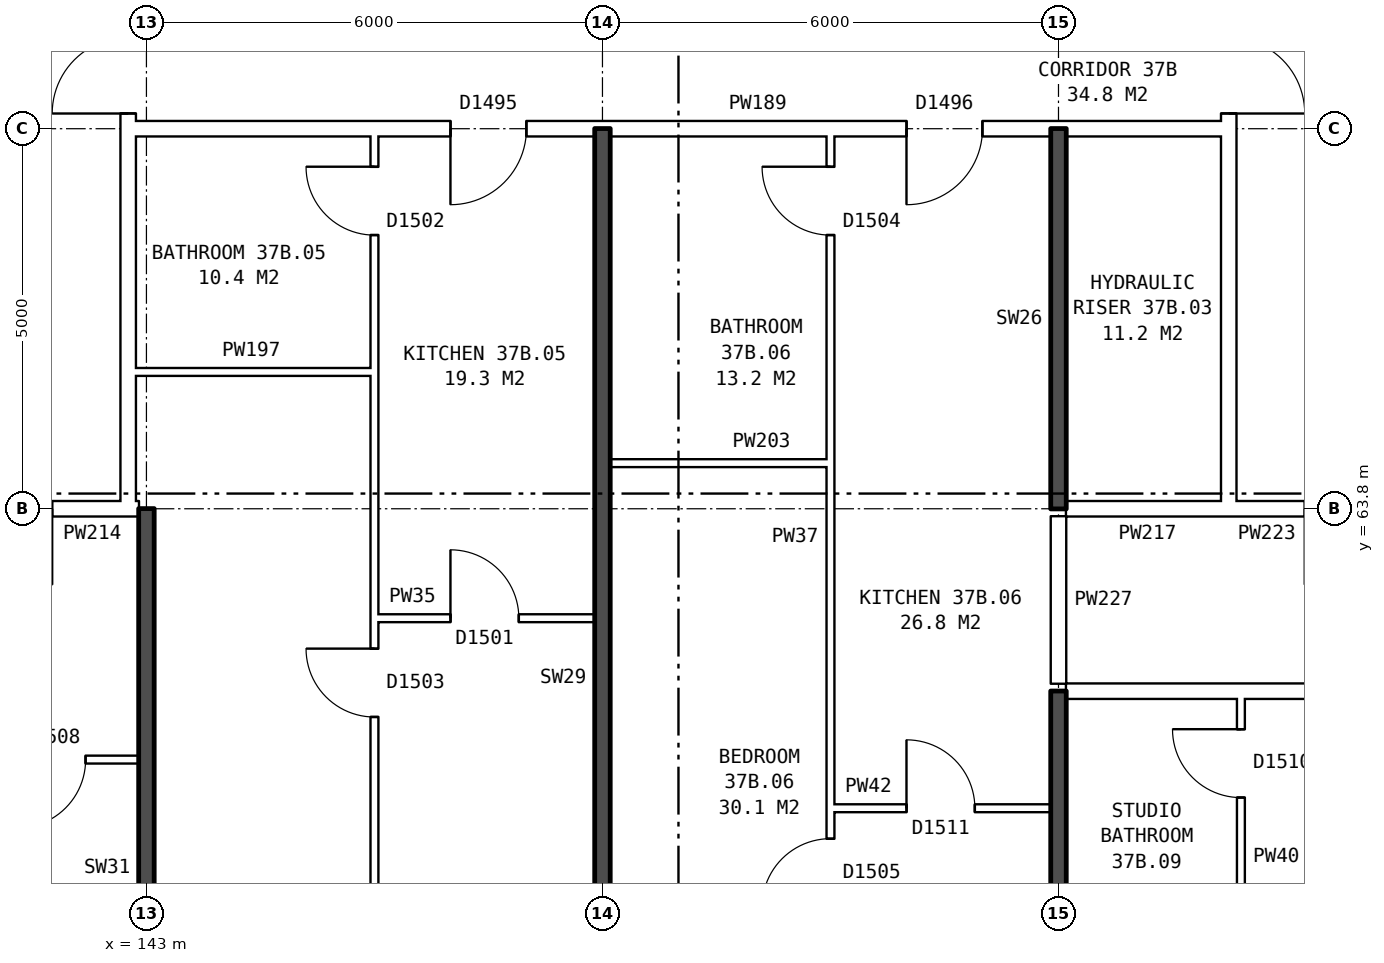
"""IFC4 building model, lengths in metres.
Left out: names, types, materials, properties, quantities, classifications, styles, units other than length and angle.
Written with IfcOpenShell. Run it as: python <this file> out.ifc"""

import sys

from ifc_helpers import new_model, si_unit, direction, frame, frame_2d, origin, place, context, subcontext, project, spatial, rectangle, extrude, element, fill, save


model = new_model("IFC4")
c1 = context("Model", 3, precision=1e-05, world=origin(), true_north=direction((0.0, 1.0)))
c2 = subcontext(c1, "Body", "Model", "MODEL_VIEW")
j1 = project(units=[si_unit("LENGTHUNIT", "METRE"), si_unit("PLANEANGLEUNIT", "RADIAN")], contexts=[c1])
p1 = place(None, origin())
s1 = spatial("IfcSite", under=j1, at=p1, CompositionType="ELEMENT")
p2 = place(p1, origin())
s2 = spatial("IfcBuilding", under=s1, at=p2, CompositionType="ELEMENT")
p3 = place(p2, frame((0.0, 0.0, 133.0)))
s3 = spatial("IfcBuildingStorey", under=s2, at=p3, CompositionType="ELEMENT", Elevation=133.0)
p4 = place(p3, frame((142.76, 63.9, 0.0), z_axis=(0.0, 0.0, 1.0), x_axis=(0.0, 1.0, 0.0)))
e1 = element("IfcWall", 1, at=p4, inside=s3, PredefinedType="PARTITIONING", context=c2, shape_type="SweptSolid", body=[
    extrude(rectangle(XDim=12.2, YDim=0.2, at=frame_2d((6.1, 0.0))), origin(), (0.0, 0.0, 1.0), 2.85),
])
p5 = place(p4, frame((5.1, 0.0, 0.0)))
e2 = element("IfcOpeningElement", 2, at=p5, cuts=e1, PredefinedType="OPENING", context=c2, shape_type="SweptSolid", body=[
    extrude(rectangle(XDim=2.0, YDim=2.1, at=frame_2d((1.0, 1.05))), frame((0.0, 0.11, 0.0), z_axis=(0.0, -1.0, 0.0), x_axis=(1.0, 0.0, 0.0)), (0.0, 0.0, 1.0), 0.22),
])
p6 = place(p3, frame((157.24, 63.9, 0.0), z_axis=(0.0, 0.0, 1.0), x_axis=(0.0, 1.0, 0.0)))
e3 = element("IfcWall", 3, at=p6, inside=s3, PredefinedType="PARTITIONING", context=c2, shape_type="SweptSolid", body=[
    extrude(rectangle(XDim=12.2, YDim=0.2, at=frame_2d((6.1, 0.0))), origin(), (0.0, 0.0, 1.0), 2.85),
])
p7 = place(p6, frame((5.1, 0.0, 0.0)))
e4 = element("IfcOpeningElement", 4, at=p7, cuts=e3, PredefinedType="OPENING", context=c2, shape_type="SweptSolid", body=[
    extrude(rectangle(XDim=2.0, YDim=2.1, at=frame_2d((1.0, 1.05))), frame((0.0, 0.11, 0.0), z_axis=(0.0, -1.0, 0.0), x_axis=(1.0, 0.0, 0.0)), (0.0, 0.0, 1.0), 0.22),
])
p8 = place(p3, frame((152.0, 59.86, 0.0), z_axis=(0.0, 0.0, 1.0), x_axis=(1.0, 0.0, 0.0)))
e5 = element("IfcWall", 5, at=p8, inside=s3, PredefinedType="PARTITIONING", context=c2, shape_type="SweptSolid", body=[
    extrude(rectangle(XDim=2.9, YDim=0.1, at=frame_2d((1.45, 0.0))), origin(), (0.0, 0.0, 1.0), 2.85),
])
p9 = place(p8, frame((1.0, 0.0, 0.0)))
e6 = element("IfcOpeningElement", 6, at=p9, cuts=e5, PredefinedType="OPENING", context=c2, shape_type="SweptSolid", body=[
    extrude(rectangle(XDim=0.9, YDim=2.1, at=frame_2d((0.45, 1.05))), frame((0.0, 0.06, 0.0), z_axis=(0.0, -1.0, 0.0), x_axis=(1.0, 0.0, 0.0)), (0.0, 0.0, 1.0), 0.12),
])
p10 = place(p3, frame((137.1, 60.5, 0.0), z_axis=(0.0, 0.0, 1.0), x_axis=(1.0, 0.0, 0.0)))
e7 = element("IfcWall", 7, at=p10, inside=s3, PredefinedType="PARTITIONING", context=c2, shape_type="SweptSolid", body=[
    extrude(rectangle(XDim=5.8, YDim=0.1, at=frame_2d((2.9, 0.0))), origin(), (0.0, 0.0, 1.0), 2.85),
])
p11 = place(p10, frame((1.3, 0.0, 0.0)))
e8 = element("IfcOpeningElement", 8, at=p11, cuts=e7, PredefinedType="OPENING", context=c2, shape_type="SweptSolid", body=[
    extrude(rectangle(XDim=0.9, YDim=2.1, at=frame_2d((0.45, 1.05))), frame((0.0, 0.06, 0.0), z_axis=(0.0, -1.0, 0.0), x_axis=(1.0, 0.0, 0.0)), (0.0, 0.0, 1.0), 0.12),
])
p12 = place(p10, frame((4.2, 0.0, 0.0)))
e9 = element("IfcOpeningElement", 9, at=p12, cuts=e7, PredefinedType="OPENING", context=c2, shape_type="SweptSolid", body=[
    extrude(rectangle(XDim=0.9, YDim=2.1, at=frame_2d((0.45, 1.05))), frame((0.0, 0.06, 0.0), z_axis=(0.0, -1.0, 0.0), x_axis=(1.0, 0.0, 0.0)), (0.0, 0.0, 1.0), 0.12),
])
p13 = place(p3, frame((155.1, 61.4, 0.0), z_axis=(0.0, 0.0, 1.0), x_axis=(1.0, 0.0, 0.0)))
e10 = element("IfcWall", 10, at=p13, inside=s3, PredefinedType="PARTITIONING", context=c2, shape_type="SweptSolid", body=[
    extrude(rectangle(XDim=17.29, YDim=0.2, at=frame_2d((8.645, 0.0))), origin(), (0.0, 0.0, 1.0), 2.85),
])
p14 = place(p13, frame((3.6, 0.0, 0.0)))
e11 = element("IfcOpeningElement", 11, at=p14, cuts=e10, PredefinedType="OPENING", context=c2, shape_type="SweptSolid", body=[
    extrude(rectangle(XDim=1.0, YDim=2.1, at=frame_2d((0.5, 1.05))), frame((0.0, 0.11, 0.0), z_axis=(0.0, -1.0, 0.0), x_axis=(1.0, 0.0, 0.0)), (0.0, 0.0, 1.0), 0.22),
])
p15 = place(p13, frame((8.4, 0.0, 0.0)))
e12 = element("IfcOpeningElement", 12, at=p15, cuts=e10, PredefinedType="OPENING", context=c2, shape_type="SweptSolid", body=[
    extrude(rectangle(XDim=1.0, YDim=2.1, at=frame_2d((0.5, 1.05))), frame((0.0, 0.11, 0.0), z_axis=(0.0, -1.0, 0.0), x_axis=(1.0, 0.0, 0.0)), (0.0, 0.0, 1.0), 0.22),
])
p16 = place(p3, frame((146.0, 62.36, 0.0), z_axis=(0.0, 0.0, 1.0), x_axis=(1.0, 0.0, 0.0)))
e13 = element("IfcWall", 13, at=p16, inside=s3, PredefinedType="PARTITIONING", context=c2, shape_type="SweptSolid", body=[
    extrude(rectangle(XDim=2.9, YDim=0.1, at=frame_2d((1.45, 0.0))), origin(), (0.0, 0.0, 1.0), 2.85),
])
p17 = place(p16, frame((1.0, 0.0, 0.0)))
e14 = element("IfcOpeningElement", 14, at=p17, cuts=e13, PredefinedType="OPENING", context=c2, shape_type="SweptSolid", body=[
    extrude(rectangle(XDim=0.9, YDim=2.1, at=frame_2d((0.45, 1.05))), frame((0.0, 0.06, 0.0), z_axis=(0.0, -1.0, 0.0), x_axis=(1.0, 0.0, 0.0)), (0.0, 0.0, 1.0), 0.12),
])
p18 = place(p3, frame((139.76, 63.8, 0.0), z_axis=(0.0, 0.0, 1.0), x_axis=(1.0, 0.0, 0.0)))
e15 = element("IfcWall", 15, at=p18, inside=s3, PredefinedType="PARTITIONING", context=c2, shape_type="SweptSolid", body=[
    extrude(rectangle(XDim=3.0, YDim=0.2, at=frame_2d((1.5, 0.0))), origin(), (0.0, 0.0, 1.0), 2.85),
])
p19 = place(p18, frame((1.0, 0.0, 0.0)))
e16 = element("IfcOpeningElement", 16, at=p19, cuts=e15, PredefinedType="OPENING", context=c2, shape_type="SweptSolid", body=[
    extrude(rectangle(XDim=1.0, YDim=2.1, at=frame_2d((0.5, 1.05))), frame((0.0, 0.11, 0.0), z_axis=(0.0, -1.0, 0.0), x_axis=(1.0, 0.0, 0.0)), (0.0, 0.0, 1.0), 0.22),
])
p20 = place(p3, frame((142.76, 63.8, 0.0), z_axis=(0.0, 0.0, 1.0), x_axis=(1.0, 0.0, 0.0)))
e17 = element("IfcWall", 17, at=p20, inside=s3, PredefinedType="PARTITIONING", context=c2, shape_type="SweptSolid", body=[
    extrude(rectangle(XDim=0.14, YDim=0.2, at=frame_2d((0.07, 0.0))), origin(), (0.0, 0.0, 1.0), 2.85),
])
p21 = place(p3, frame((155.1, 63.8, 0.0), z_axis=(0.0, 0.0, 1.0), x_axis=(1.0, 0.0, 0.0)))
e18 = element("IfcWall", 18, at=p21, inside=s3, PredefinedType="PARTITIONING", context=c2, shape_type="SweptSolid", body=[
    extrude(rectangle(XDim=2.14, YDim=0.2, at=frame_2d((1.07, 0.0))), origin(), (0.0, 0.0, 1.0), 2.85),
])
p22 = place(p3, frame((157.24, 63.8, 0.0), z_axis=(0.0, 0.0, 1.0), x_axis=(1.0, 0.0, 0.0)))
e19 = element("IfcWall", 19, at=p22, inside=s3, PredefinedType="PARTITIONING", context=c2, shape_type="SweptSolid", body=[
    extrude(rectangle(XDim=3.0, YDim=0.2, at=frame_2d((1.5, 0.0))), origin(), (0.0, 0.0, 1.0), 2.85),
])
p23 = place(p22, frame((1.0, 0.0, 0.0)))
e20 = element("IfcOpeningElement", 20, at=p23, cuts=e19, PredefinedType="OPENING", context=c2, shape_type="SweptSolid", body=[
    extrude(rectangle(XDim=1.0, YDim=2.1, at=frame_2d((0.5, 1.05))), frame((0.0, 0.11, 0.0), z_axis=(0.0, -1.0, 0.0), x_axis=(1.0, 0.0, 0.0)), (0.0, 0.0, 1.0), 0.22),
])
p24 = place(p3, frame((149.1, 64.4, 0.0), z_axis=(0.0, 0.0, 1.0), x_axis=(1.0, 0.0, 0.0)))
e21 = element("IfcWall", 21, at=p24, inside=s3, PredefinedType="PARTITIONING", context=c2, shape_type="SweptSolid", body=[
    extrude(rectangle(XDim=2.9, YDim=0.1, at=frame_2d((1.45, 0.0))), origin(), (0.0, 0.0, 1.0), 2.85),
])
p25 = place(p3, frame((142.76, 65.6, 0.0), z_axis=(0.0, 0.0, 1.0), x_axis=(1.0, 0.0, 0.0)))
e22 = element("IfcWall", 22, at=p25, inside=s3, PredefinedType="PARTITIONING", context=c2, shape_type="SweptSolid", body=[
    extrude(rectangle(XDim=3.24, YDim=0.1, at=frame_2d((1.62, 0.0))), origin(), (0.0, 0.0, 1.0), 2.85),
])
p26 = place(p3, frame((142.76, 68.8, 0.0), z_axis=(0.0, 0.0, 1.0), x_axis=(1.0, 0.0, 0.0)))
e23 = element("IfcWall", 23, at=p26, inside=s3, PredefinedType="PARTITIONING", context=c2, shape_type="SweptSolid", body=[
    extrude(rectangle(XDim=14.48, YDim=0.2, at=frame_2d((7.24, 0.0))), origin(), (0.0, 0.0, 1.0), 2.85),
])
p27 = place(p26, frame((4.24, 0.0, 0.0)))
e24 = element("IfcOpeningElement", 24, at=p27, cuts=e23, PredefinedType="OPENING", context=c2, shape_type="SweptSolid", body=[
    extrude(rectangle(XDim=1.0, YDim=2.1, at=frame_2d((0.5, 1.05))), frame((0.0, 0.11, 0.0), z_axis=(0.0, -1.0, 0.0), x_axis=(1.0, 0.0, 0.0)), (0.0, 0.0, 1.0), 0.22),
])
p28 = place(p26, frame((10.24, 0.0, 0.0)))
e25 = element("IfcOpeningElement", 25, at=p28, cuts=e23, PredefinedType="OPENING", context=c2, shape_type="SweptSolid", body=[
    extrude(rectangle(XDim=1.0, YDim=2.1, at=frame_2d((0.5, 1.05))), frame((0.0, 0.11, 0.0), z_axis=(0.0, -1.0, 0.0), x_axis=(1.0, 0.0, 0.0)), (0.0, 0.0, 1.0), 0.22),
])
p29 = place(p3, frame((143.0, 54.36, 0.0), z_axis=(0.0, 0.0, 1.0), x_axis=(0.0, 1.0, 0.0)))
e26 = element("IfcWall", 26, at=p29, inside=s3, PredefinedType="SOLIDWALL", context=c2, shape_type="SweptSolid", body=[
    extrude(rectangle(XDim=9.44, YDim=0.2, at=frame_2d((4.72, 0.0))), origin(), (0.0, 0.0, 1.0), 2.85),
])
p30 = place(p3, frame((146.0, 54.36, 0.0), z_axis=(0.0, 0.0, 1.0), x_axis=(0.0, 1.0, 0.0)))
e27 = element("IfcWall", 27, at=p30, inside=s3, PredefinedType="PARTITIONING", context=c2, shape_type="SweptSolid", body=[
    extrude(rectangle(XDim=14.34, YDim=0.1, at=frame_2d((7.17, 0.0))), origin(), (0.0, 0.0, 1.0), 2.85),
])
p31 = place(p30, frame((6.7, 0.0, 0.0)))
e28 = element("IfcOpeningElement", 28, at=p31, cuts=e27, PredefinedType="OPENING", context=c2, shape_type="SweptSolid", body=[
    extrude(rectangle(XDim=0.9, YDim=2.1, at=frame_2d((0.45, 1.05))), frame((0.0, 0.06, 0.0), z_axis=(0.0, -1.0, 0.0), x_axis=(1.0, 0.0, 0.0)), (0.0, 0.0, 1.0), 0.12),
])
p32 = place(p30, frame((13.04, 0.0, 0.0)))
e29 = element("IfcOpeningElement", 29, at=p32, cuts=e27, PredefinedType="OPENING", context=c2, shape_type="SweptSolid", body=[
    extrude(rectangle(XDim=0.9, YDim=2.1, at=frame_2d((0.45, 1.05))), frame((0.0, 0.06, 0.0), z_axis=(0.0, -1.0, 0.0), x_axis=(1.0, 0.0, 0.0)), (0.0, 0.0, 1.0), 0.12),
])
p33 = place(p3, frame((149.0, 54.36, 0.0), z_axis=(0.0, 0.0, 1.0), x_axis=(0.0, 1.0, 0.0)))
e30 = element("IfcWall", 30, at=p33, inside=s3, PredefinedType="SOLIDWALL", context=c2, shape_type="SweptSolid", body=[
    extrude(rectangle(XDim=14.44, YDim=0.2, at=frame_2d((7.22, 0.0))), origin(), (0.0, 0.0, 1.0), 2.85),
])
p34 = place(p3, frame((152.0, 54.36, 0.0), z_axis=(0.0, 0.0, 1.0), x_axis=(0.0, 1.0, 0.0)))
e31 = element("IfcWall", 31, at=p34, inside=s3, PredefinedType="PARTITIONING", context=c2, shape_type="SweptSolid", body=[
    extrude(rectangle(XDim=14.34, YDim=0.1, at=frame_2d((7.17, 0.0))), origin(), (0.0, 0.0, 1.0), 2.85),
])
p35 = place(p34, frame((4.2, 0.0, 0.0)))
e32 = element("IfcOpeningElement", 32, at=p35, cuts=e31, PredefinedType="OPENING", context=c2, shape_type="SweptSolid", body=[
    extrude(rectangle(XDim=0.9, YDim=2.1, at=frame_2d((0.45, 1.05))), frame((0.0, 0.06, 0.0), z_axis=(0.0, -1.0, 0.0), x_axis=(1.0, 0.0, 0.0)), (0.0, 0.0, 1.0), 0.12),
])
p36 = place(p34, frame((13.04, 0.0, 0.0)))
e33 = element("IfcOpeningElement", 33, at=p36, cuts=e31, PredefinedType="OPENING", context=c2, shape_type="SweptSolid", body=[
    extrude(rectangle(XDim=0.9, YDim=2.1, at=frame_2d((0.45, 1.05))), frame((0.0, 0.06, 0.0), z_axis=(0.0, -1.0, 0.0), x_axis=(1.0, 0.0, 0.0)), (0.0, 0.0, 1.0), 0.12),
])
p37 = place(p3, frame((155.0, 54.36, 0.0), z_axis=(0.0, 0.0, 1.0), x_axis=(0.0, 1.0, 0.0)))
e34 = element("IfcWall", 34, at=p37, inside=s3, PredefinedType="SOLIDWALL", context=c2, shape_type="SweptSolid", body=[
    extrude(rectangle(XDim=7.04, YDim=0.2, at=frame_2d((3.52, 0.0))), origin(), (0.0, 0.0, 1.0), 2.85),
])
p38 = place(p3, frame((155.0, 61.5, 0.0), z_axis=(0.0, 0.0, 1.0), x_axis=(0.0, 1.0, 0.0)))
e35 = element("IfcWall", 35, at=p38, inside=s3, PredefinedType="PARTITIONING", context=c2, shape_type="SweptSolid", body=[
    extrude(rectangle(XDim=2.2, YDim=0.2, at=frame_2d((1.1, 0.0))), origin(), (0.0, 0.0, 1.0), 2.85),
])
p39 = place(p3, frame((155.0, 63.8, 0.0), z_axis=(0.0, 0.0, 1.0), x_axis=(0.0, 1.0, 0.0)))
e36 = element("IfcWall", 36, at=p39, inside=s3, PredefinedType="SOLIDWALL", context=c2, shape_type="SweptSolid", body=[
    extrude(rectangle(XDim=5.0, YDim=0.2, at=frame_2d((2.5, 0.0))), origin(), (0.0, 0.0, 1.0), 2.85),
])
p40 = place(p3, frame((157.4, 58.45, 0.0), z_axis=(0.0, 0.0, 1.0), x_axis=(0.0, 1.0, 0.0)))
e37 = element("IfcWall", 37, at=p40, inside=s3, PredefinedType="PARTITIONING", context=c2, shape_type="SweptSolid", body=[
    extrude(rectangle(XDim=2.85, YDim=0.1, at=frame_2d((1.425, 0.0))), origin(), (0.0, 0.0, 1.0), 2.85),
])
p41 = place(p40, frame((1.55, 0.0, 0.0)))
e38 = element("IfcOpeningElement", 38, at=p41, cuts=e37, PredefinedType="OPENING", context=c2, shape_type="SweptSolid", body=[
    extrude(rectangle(XDim=0.9, YDim=2.1, at=frame_2d((0.45, 1.05))), frame((0.0, 0.06, 0.0), z_axis=(0.0, -1.0, 0.0), x_axis=(1.0, 0.0, 0.0)), (0.0, 0.0, 1.0), 0.12),
])
p42 = place(p5, origin())
e39 = element("IfcDoor", 39, at=p42, inside=s3, OperationType="DOUBLE_DOOR_SINGLE_SWING", PredefinedType="DOOR", context=c2, shape_type="SweptSolid", body=[
    extrude(rectangle(XDim=2.0, YDim=2.1, at=frame_2d((1.0, 1.05))), frame((0.0, 0.025, 0.0), z_axis=(0.0, -1.0, 0.0), x_axis=(1.0, 0.0, 0.0)), (0.0, 0.0, 1.0), 0.05),
])
fill(e2, e39)
p43 = place(p7, frame((2.0, 0.0, 0.0), z_axis=(0.0, 0.0, 1.0), x_axis=(-1.0, 0.0, 0.0)))
e40 = element("IfcDoor", 40, at=p43, inside=s3, OperationType="DOUBLE_DOOR_SINGLE_SWING", PredefinedType="DOOR", context=c2, shape_type="SweptSolid", body=[
    extrude(rectangle(XDim=2.0, YDim=2.1, at=frame_2d((1.0, 1.05))), frame((0.0, 0.025, 0.0), z_axis=(0.0, -1.0, 0.0), x_axis=(1.0, 0.0, 0.0)), (0.0, 0.0, 1.0), 0.05),
])
fill(e4, e40)
p44 = place(p12, frame((0.9, 0.0, 0.0), z_axis=(0.0, 0.0, 1.0), x_axis=(-1.0, 0.0, 0.0)))
e41 = element("IfcDoor", 41, at=p44, inside=s3, OperationType="SINGLE_SWING_RIGHT", PredefinedType="DOOR", context=c2, shape_type="SweptSolid", body=[
    extrude(rectangle(XDim=0.9, YDim=2.1, at=frame_2d((0.45, 1.05))), frame((0.0, 0.025, 0.0), z_axis=(0.0, -1.0, 0.0), x_axis=(1.0, 0.0, 0.0)), (0.0, 0.0, 1.0), 0.05),
])
fill(e9, e41)
p45 = place(p31, origin())
e42 = element("IfcDoor", 42, at=p45, inside=s3, OperationType="SINGLE_SWING_RIGHT", PredefinedType="DOOR", context=c2, shape_type="SweptSolid", body=[
    extrude(rectangle(XDim=0.9, YDim=2.1, at=frame_2d((0.45, 1.05))), frame((0.0, 0.025, 0.0), z_axis=(0.0, -1.0, 0.0), x_axis=(1.0, 0.0, 0.0)), (0.0, 0.0, 1.0), 0.05),
])
fill(e28, e42)
p46 = place(p27, frame((1.0, 0.0, 0.0), z_axis=(0.0, 0.0, 1.0), x_axis=(-1.0, 0.0, 0.0)))
e43 = element("IfcDoor", 43, at=p46, inside=s3, OperationType="SINGLE_SWING_RIGHT", PredefinedType="DOOR", context=c2, shape_type="SweptSolid", body=[
    extrude(rectangle(XDim=1.0, YDim=2.1, at=frame_2d((0.5, 1.05))), frame((0.0, 0.025, 0.0), z_axis=(0.0, -1.0, 0.0), x_axis=(1.0, 0.0, 0.0)), (0.0, 0.0, 1.0), 0.05),
])
fill(e24, e43)
p47 = place(p17, origin())
e44 = element("IfcDoor", 44, at=p47, inside=s3, OperationType="SINGLE_SWING_LEFT", PredefinedType="DOOR", context=c2, shape_type="SweptSolid", body=[
    extrude(rectangle(XDim=0.9, YDim=2.1, at=frame_2d((0.45, 1.05))), frame((0.0, 0.025, 0.0), z_axis=(0.0, -1.0, 0.0), x_axis=(1.0, 0.0, 0.0)), (0.0, 0.0, 1.0), 0.05),
])
fill(e14, e44)
p48 = place(p32, origin())
e45 = element("IfcDoor", 45, at=p48, inside=s3, OperationType="SINGLE_SWING_RIGHT", PredefinedType="DOOR", context=c2, shape_type="SweptSolid", body=[
    extrude(rectangle(XDim=0.9, YDim=2.1, at=frame_2d((0.45, 1.05))), frame((0.0, 0.025, 0.0), z_axis=(0.0, -1.0, 0.0), x_axis=(1.0, 0.0, 0.0)), (0.0, 0.0, 1.0), 0.05),
])
fill(e29, e45)
p49 = place(p35, origin())
e46 = element("IfcDoor", 46, at=p49, inside=s3, OperationType="SINGLE_SWING_LEFT", PredefinedType="DOOR", context=c2, shape_type="SweptSolid", body=[
    extrude(rectangle(XDim=0.9, YDim=2.1, at=frame_2d((0.45, 1.05))), frame((0.0, 0.025, 0.0), z_axis=(0.0, -1.0, 0.0), x_axis=(1.0, 0.0, 0.0)), (0.0, 0.0, 1.0), 0.05),
])
fill(e32, e46)
p50 = place(p28, frame((1.0, 0.0, 0.0), z_axis=(0.0, 0.0, 1.0), x_axis=(-1.0, 0.0, 0.0)))
e47 = element("IfcDoor", 47, at=p50, inside=s3, OperationType="SINGLE_SWING_RIGHT", PredefinedType="DOOR", context=c2, shape_type="SweptSolid", body=[
    extrude(rectangle(XDim=1.0, YDim=2.1, at=frame_2d((0.5, 1.05))), frame((0.0, 0.025, 0.0), z_axis=(0.0, -1.0, 0.0), x_axis=(1.0, 0.0, 0.0)), (0.0, 0.0, 1.0), 0.05),
])
fill(e25, e47)
p51 = place(p9, origin())
e48 = element("IfcDoor", 48, at=p51, inside=s3, OperationType="SINGLE_SWING_LEFT", PredefinedType="DOOR", context=c2, shape_type="SweptSolid", body=[
    extrude(rectangle(XDim=0.9, YDim=2.1, at=frame_2d((0.45, 1.05))), frame((0.0, 0.025, 0.0), z_axis=(0.0, -1.0, 0.0), x_axis=(1.0, 0.0, 0.0)), (0.0, 0.0, 1.0), 0.05),
])
fill(e6, e48)
p52 = place(p36, origin())
e49 = element("IfcDoor", 49, at=p52, inside=s3, OperationType="SINGLE_SWING_RIGHT", PredefinedType="DOOR", context=c2, shape_type="SweptSolid", body=[
    extrude(rectangle(XDim=0.9, YDim=2.1, at=frame_2d((0.45, 1.05))), frame((0.0, 0.025, 0.0), z_axis=(0.0, -1.0, 0.0), x_axis=(1.0, 0.0, 0.0)), (0.0, 0.0, 1.0), 0.05),
])
fill(e33, e49)
p53 = place(p41, origin())
e50 = element("IfcDoor", 50, at=p53, inside=s3, OperationType="SINGLE_SWING_RIGHT", PredefinedType="DOOR", context=c2, shape_type="SweptSolid", body=[
    extrude(rectangle(XDim=0.9, YDim=2.1, at=frame_2d((0.45, 1.05))), frame((0.0, 0.025, 0.0), z_axis=(0.0, -1.0, 0.0), x_axis=(1.0, 0.0, 0.0)), (0.0, 0.0, 1.0), 0.05),
])
fill(e38, e50)
save(model, sys.argv[1])
